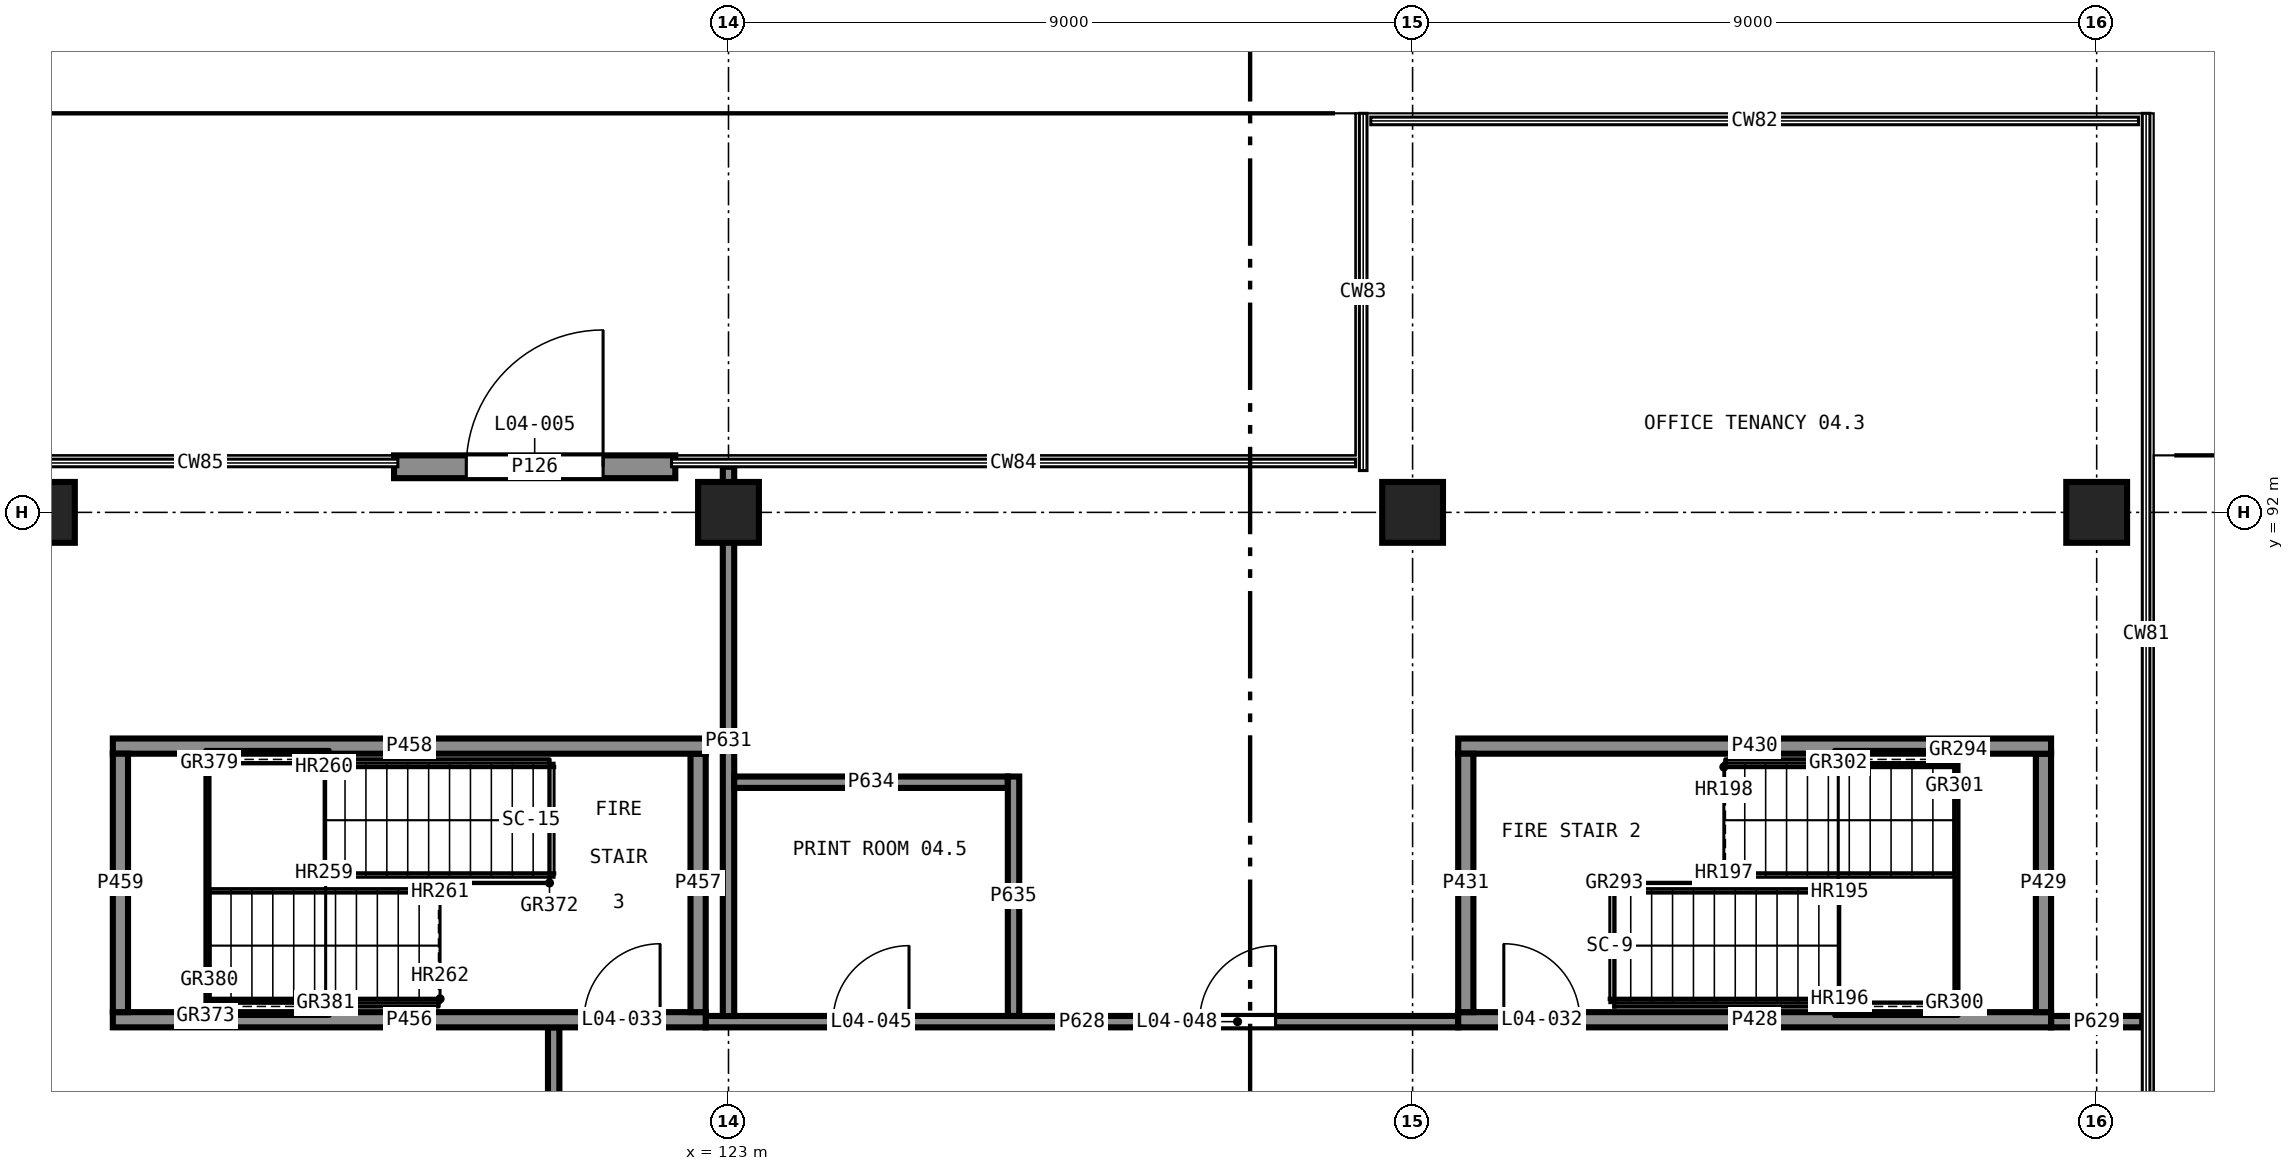
"""IFC4 building model, lengths in metres.
Left out: names, types, materials, properties, quantities, classifications, styles, units other than length and angle.
Written with IfcOpenShell. Run it as: python <this file> out.ifc"""

import sys

from ifc_helpers import new_model, si_unit, direction, frame, frame_2d, origin, origin_2d, place, context, subcontext, project, spatial, rectangle, extrude, element, fill, save


model = new_model("IFC4")
c1 = context("Model", 3, precision=1e-05, world=origin(), true_north=direction((0.0, 1.0)))
c2 = subcontext(c1, "Body", "Model", "MODEL_VIEW")
j1 = project(units=[si_unit("LENGTHUNIT", "METRE"), si_unit("PLANEANGLEUNIT", "RADIAN")], contexts=[c1])
p1 = place(None, origin())
s1 = spatial("IfcSite", under=j1, at=p1, CompositionType="ELEMENT")
p2 = place(p1, origin())
s2 = spatial("IfcBuilding", under=s1, at=p2, CompositionType="ELEMENT")
p3 = place(p2, frame((0.0, 0.0, 17.5)))
s3 = spatial("IfcBuildingStorey", under=s2, at=p3, CompositionType="ELEMENT", Elevation=17.5)
for number, where, z_axis, x_axis in (
    (1, (114.0, 92.0, 0.0), (0.0, 0.0, 1.0), (1.0, 0.0, 0.0)),
    (2, (123.0, 92.0, 0.0), (0.0, 0.0, 1.0), (1.0, 0.0, 0.0)),
    (3, (132.0, 92.0, 0.0), (0.0, 0.0, 1.0), (1.0, 0.0, 0.0)),
    (4, (141.0, 92.0, 0.0), (0.0, 0.0, 1.0), (1.0, 0.0, 0.0)),
):
    element("IfcColumn", number, at=place(p3, frame(where, z_axis=z_axis, x_axis=x_axis)), inside=s3, PredefinedType="COLUMN", context=c2, shape_type="SweptSolid", body=[
        extrude(rectangle(XDim=0.8, YDim=0.8, at=origin_2d()), origin(), (0.0, 0.0, 1.0), 4.0),
    ])
p4 = place(p3, frame((122.3, 92.6, 0.0), z_axis=(0.0, 0.0, 1.0), x_axis=(-1.0, 0.0, 0.0)))
e5 = element("IfcWall", 5, at=p4, inside=s3, PredefinedType="SOLIDWALL", context=c2, shape_type="SweptSolid", body=[
    extrude(rectangle(XDim=3.7, YDim=0.3, at=frame_2d((1.85, 0.0))), origin(), (0.0, 0.0, 1.0), 3.75),
])
p5 = place(p4, frame((0.95, 0.0, 0.0)))
e6 = element("IfcOpeningElement", 6, at=p5, cuts=e5, PredefinedType="OPENING", context=c2, shape_type="SweptSolid", body=[
    extrude(rectangle(XDim=1.8, YDim=2.4, at=frame_2d((0.9, 1.2))), frame((0.0, 0.16, 0.0), z_axis=(0.0, -1.0, 0.0), x_axis=(1.0, 0.0, 0.0)), (0.0, 0.0, 1.0), 0.32),
])
p6 = place(p3, frame((132.6, 85.325, 0.0), z_axis=(0.0, 0.0, 1.0), x_axis=(1.0, 0.0, 0.0)))
e7 = element("IfcWall", 7, at=p6, inside=s3, PredefinedType="SHEAR", context=c2, shape_type="SweptSolid", body=[
    extrude(rectangle(XDim=7.8, YDim=0.2, at=frame_2d((3.9, 0.0))), origin(), (0.0, 0.0, 1.0), 3.75),
])
p7 = place(p6, frame((0.6, 0.0, 0.0)))
e8 = element("IfcOpeningElement", 8, at=p7, cuts=e7, PredefinedType="OPENING", context=c2, shape_type="SweptSolid", body=[
    extrude(rectangle(XDim=1.0, YDim=2.1, at=frame_2d((0.5, 1.05))), frame((0.0, 0.11, 0.0), z_axis=(0.0, -1.0, 0.0), x_axis=(1.0, 0.0, 0.0)), (0.0, 0.0, 1.0), 0.22),
])
p8 = place(p3, frame((140.3, 85.425, 0.0), z_axis=(0.0, 0.0, 1.0), x_axis=(0.0, 1.0, 0.0)))
e9 = element("IfcWall", 9, at=p8, inside=s3, PredefinedType="SHEAR", context=c2, shape_type="SweptSolid", body=[
    extrude(rectangle(XDim=3.4, YDim=0.2, at=frame_2d((1.7, 0.0))), origin(), (0.0, 0.0, 1.0), 3.75),
])
p9 = place(p3, frame((140.4, 88.925, 0.0), z_axis=(0.0, 0.0, 1.0), x_axis=(-1.0, 0.0, 0.0)))
e10 = element("IfcWall", 10, at=p9, inside=s3, PredefinedType="SHEAR", context=c2, shape_type="SweptSolid", body=[
    extrude(rectangle(XDim=7.8, YDim=0.2, at=frame_2d((3.9, 0.0))), origin(), (0.0, 0.0, 1.0), 3.75),
])
p10 = place(p3, frame((132.7, 88.825, 0.0), z_axis=(0.0, 0.0, 1.0), x_axis=(0.0, -1.0, 0.0)))
e11 = element("IfcWall", 11, at=p10, inside=s3, PredefinedType="SHEAR", context=c2, shape_type="SweptSolid", body=[
    extrude(rectangle(XDim=3.4, YDim=0.2, at=frame_2d((1.7, 0.0))), origin(), (0.0, 0.0, 1.0), 3.75),
])
p11 = place(p3, frame((114.9, 85.325, 0.0), z_axis=(0.0, 0.0, 1.0), x_axis=(1.0, 0.0, 0.0)))
e12 = element("IfcWall", 12, at=p11, inside=s3, PredefinedType="SHEAR", context=c2, shape_type="SweptSolid", body=[
    extrude(rectangle(XDim=7.8, YDim=0.2, at=frame_2d((3.9, 0.0))), origin(), (0.0, 0.0, 1.0), 3.75),
])
p12 = place(p11, frame((6.2, 0.0, 0.0)))
e13 = element("IfcOpeningElement", 13, at=p12, cuts=e12, PredefinedType="OPENING", context=c2, shape_type="SweptSolid", body=[
    extrude(rectangle(XDim=1.0, YDim=2.1, at=frame_2d((0.5, 1.05))), frame((0.0, 0.11, 0.0), z_axis=(0.0, -1.0, 0.0), x_axis=(1.0, 0.0, 0.0)), (0.0, 0.0, 1.0), 0.22),
])
p13 = place(p3, frame((122.6, 85.425, 0.0), z_axis=(0.0, 0.0, 1.0), x_axis=(0.0, 1.0, 0.0)))
e14 = element("IfcWall", 14, at=p13, inside=s3, PredefinedType="SHEAR", context=c2, shape_type="SweptSolid", body=[
    extrude(rectangle(XDim=3.4, YDim=0.2, at=frame_2d((1.7, 0.0))), origin(), (0.0, 0.0, 1.0), 3.75),
])
p14 = place(p3, frame((122.7, 88.925, 0.0), z_axis=(0.0, 0.0, 1.0), x_axis=(-1.0, 0.0, 0.0)))
e15 = element("IfcWall", 15, at=p14, inside=s3, PredefinedType="SHEAR", context=c2, shape_type="SweptSolid", body=[
    extrude(rectangle(XDim=7.8, YDim=0.2, at=frame_2d((3.9, 0.0))), origin(), (0.0, 0.0, 1.0), 3.75),
])
p15 = place(p3, frame((115.0, 88.825, 0.0), z_axis=(0.0, 0.0, 1.0), x_axis=(0.0, -1.0, 0.0)))
e16 = element("IfcWall", 16, at=p15, inside=s3, PredefinedType="SHEAR", context=c2, shape_type="SweptSolid", body=[
    extrude(rectangle(XDim=3.4, YDim=0.2, at=frame_2d((1.7, 0.0))), origin(), (0.0, 0.0, 1.0), 3.75),
])
p16 = place(p3, frame((120.7, 62.7, 0.0), z_axis=(0.0, 0.0, 1.0), x_axis=(0.0, 1.0, 0.0)))
e17 = element("IfcWall", 17, at=p16, inside=s3, PredefinedType="PARTITIONING", context=c2, shape_type="SweptSolid", body=[
    extrude(rectangle(XDim=22.525, YDim=0.15, at=frame_2d((11.263, 0.0))), origin(), (0.0, 0.0, 1.0), 3.75),
])
p17 = place(p16, frame((10.748, 0.0, 0.0)))
e18 = element("IfcOpeningElement", 18, at=p17, cuts=e17, PredefinedType="OPENING", context=c2, shape_type="SweptSolid", body=[
    extrude(rectangle(XDim=1.0, YDim=2.1, at=frame_2d((0.5, 1.05))), frame((0.0, 0.085, 0.0), z_axis=(0.0, -1.0, 0.0), x_axis=(1.0, 0.0, 0.0)), (0.0, 0.0, 1.0), 0.17),
])
p18 = place(p3, frame((122.7, 85.3, 0.0), z_axis=(0.0, 0.0, 1.0), x_axis=(1.0, 0.0, 0.0)))
e19 = element("IfcWall", 19, at=p18, inside=s3, PredefinedType="PARTITIONING", context=c2, shape_type="SweptSolid", body=[
    extrude(rectangle(XDim=9.9, YDim=0.15, at=frame_2d((4.95, 0.0))), origin(), (0.0, 0.0, 1.0), 3.75),
])
p19 = place(p18, frame((1.675, 0.0, 0.0)))
e20 = element("IfcOpeningElement", 20, at=p19, cuts=e19, PredefinedType="OPENING", context=c2, shape_type="SweptSolid", body=[
    extrude(rectangle(XDim=1.0, YDim=2.1, at=frame_2d((0.5, 1.05))), frame((0.0, 0.085, 0.0), z_axis=(0.0, -1.0, 0.0), x_axis=(1.0, 0.0, 0.0)), (0.0, 0.0, 1.0), 0.17),
])
p20 = place(p18, frame((6.498, 0.0, 0.0)))
e21 = element("IfcOpeningElement", 21, at=p20, cuts=e19, PredefinedType="OPENING", context=c2, shape_type="SweptSolid", body=[
    extrude(rectangle(XDim=1.0, YDim=2.1, at=frame_2d((0.5, 1.05))), frame((0.0, 0.085, 0.0), z_axis=(0.0, -1.0, 0.0), x_axis=(1.0, 0.0, 0.0)), (0.0, 0.0, 1.0), 0.17),
])
p21 = place(p3, frame((140.4, 85.3, 0.0), z_axis=(0.0, 0.0, 1.0), x_axis=(1.0, 0.0, 0.0)))
e22 = element("IfcWall", 22, at=p21, inside=s3, PredefinedType="PARTITIONING", context=c2, shape_type="SweptSolid", body=[
    extrude(rectangle(XDim=1.2, YDim=0.15, at=frame_2d((0.6, 0.0))), origin(), (0.0, 0.0, 1.0), 3.75),
])
p22 = place(p3, frame((123.0, 85.374, 0.0), z_axis=(0.0, 0.0, 1.0), x_axis=(0.0, 1.0, 0.0)))
e23 = element("IfcWall", 23, at=p22, inside=s3, PredefinedType="PARTITIONING", context=c2, shape_type="SweptSolid", body=[
    extrude(rectangle(XDim=7.226, YDim=0.15, at=frame_2d((3.613, 0.0))), origin(), (0.0, 0.0, 1.0), 2.85),
])
p23 = place(p3, frame((123.075, 88.45, 0.0), z_axis=(0.0, 0.0, 1.0), x_axis=(1.0, 0.0, 0.0)))
e24 = element("IfcWall", 24, at=p23, inside=s3, PredefinedType="PARTITIONING", context=c2, shape_type="SweptSolid", body=[
    extrude(rectangle(XDim=3.6, YDim=0.15, at=frame_2d((1.8, 0.0))), origin(), (0.0, 0.0, 1.0), 3.75),
])
p24 = place(p3, frame((126.75, 85.375, 0.0), z_axis=(0.0, 0.0, 1.0), x_axis=(0.0, 1.0, 0.0)))
e25 = element("IfcWall", 25, at=p24, inside=s3, PredefinedType="PARTITIONING", context=c2, shape_type="SweptSolid", body=[
    extrude(rectangle(XDim=3.15, YDim=0.15, at=frame_2d((1.575, 0.0))), origin(), (0.0, 0.0, 1.0), 3.75),
])
p25 = place(p5, frame((1.8, 0.0, 0.0), z_axis=(0.0, 0.0, 1.0), x_axis=(-1.0, 0.0, 0.0)))
e26 = element("IfcDoor", 26, at=p25, inside=s3, OperationType="DOUBLE_DOOR_SINGLE_SWING", PredefinedType="DOOR", context=c2, shape_type="SweptSolid", body=[
    extrude(rectangle(XDim=1.8, YDim=2.4, at=frame_2d((0.9, 1.2))), frame((0.0, 0.025, 0.0), z_axis=(0.0, -1.0, 0.0), x_axis=(1.0, 0.0, 0.0)), (0.0, 0.0, 1.0), 0.05),
])
fill(e6, e26)
p26 = place(p7, origin())
e27 = element("IfcDoor", 27, at=p26, inside=s3, OperationType="SINGLE_SWING_RIGHT", PredefinedType="DOOR", context=c2, shape_type="SweptSolid", body=[
    extrude(rectangle(XDim=1.0, YDim=2.1, at=frame_2d((0.5, 1.05))), frame((0.0, 0.025, 0.0), z_axis=(0.0, -1.0, 0.0), x_axis=(1.0, 0.0, 0.0)), (0.0, 0.0, 1.0), 0.05),
])
fill(e8, e27)
p27 = place(p12, origin())
e28 = element("IfcDoor", 28, at=p27, inside=s3, OperationType="SINGLE_SWING_LEFT", PredefinedType="DOOR", context=c2, shape_type="SweptSolid", body=[
    extrude(rectangle(XDim=1.0, YDim=2.1, at=frame_2d((0.5, 1.05))), frame((0.0, 0.025, 0.0), z_axis=(0.0, -1.0, 0.0), x_axis=(1.0, 0.0, 0.0)), (0.0, 0.0, 1.0), 0.05),
])
fill(e13, e28)
p28 = place(p19, origin())
e29 = element("IfcDoor", 29, at=p28, inside=s3, OperationType="SINGLE_SWING_LEFT", PredefinedType="DOOR", context=c2, shape_type="SweptSolid", body=[
    extrude(rectangle(XDim=1.0, YDim=2.1, at=frame_2d((0.5, 1.05))), frame((0.0, 0.025, 0.0), z_axis=(0.0, -1.0, 0.0), x_axis=(1.0, 0.0, 0.0)), (0.0, 0.0, 1.0), 0.05),
])
fill(e20, e29)
p29 = place(p20, origin())
e30 = element("IfcDoor", 30, at=p29, inside=s3, OperationType="SINGLE_SWING_LEFT", PredefinedType="DOOR", context=c2, shape_type="SweptSolid", body=[
    extrude(rectangle(XDim=1.0, YDim=2.1, at=frame_2d((0.5, 1.05))), frame((0.0, 0.025, 0.0), z_axis=(0.0, -1.0, 0.0), x_axis=(1.0, 0.0, 0.0)), (0.0, 0.0, 1.0), 0.05),
])
fill(e21, e30)
save(model, sys.argv[1])
